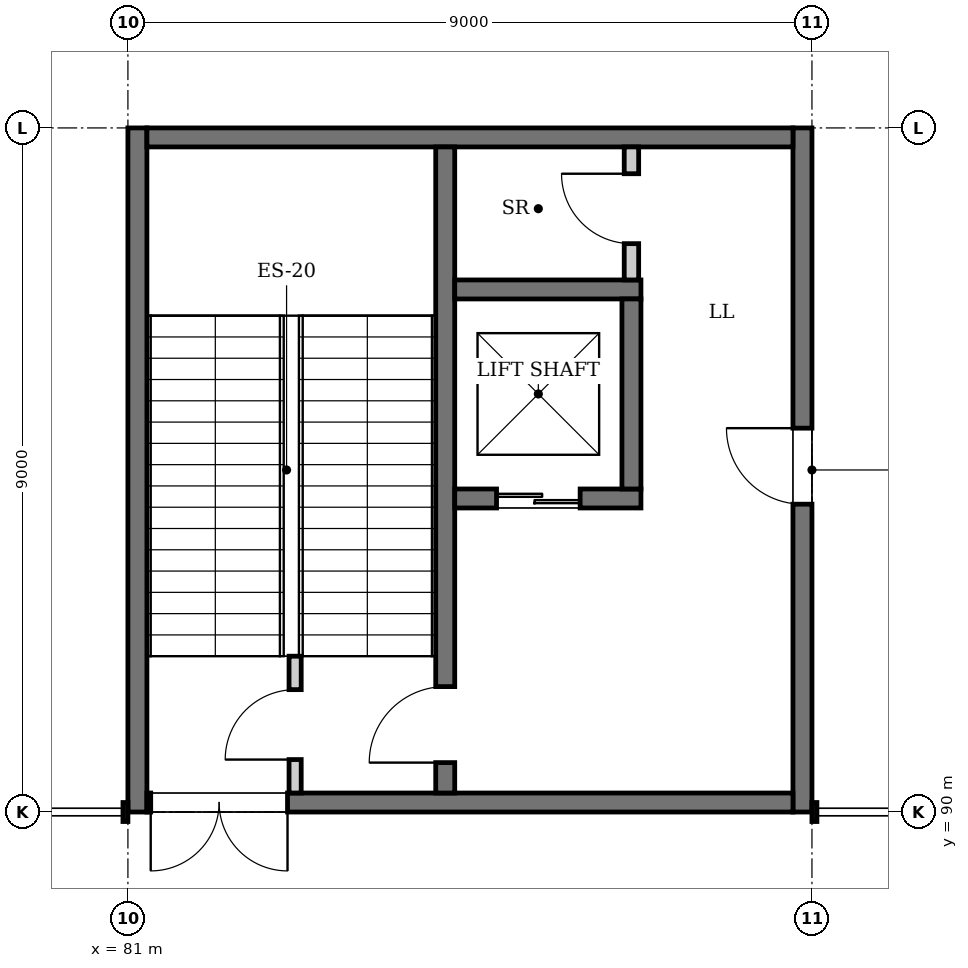
"""IFC4 building model, lengths in metres.
Left out: names, types, materials, properties, quantities, classifications, styles, units other than length and angle.
Written with IfcOpenShell. Run it as: python <this file> out.ifc"""

import sys

from ifc_helpers import new_model, si_unit, direction, frame, frame_2d, origin, place, context, subcontext, project, spatial, rectangle, extrude, element, fill, save


model = new_model("IFC4")
c1 = context("Model", 3, precision=1e-05, world=origin(), true_north=direction((0.0, 1.0)))
c2 = subcontext(c1, "Body", "Model", "MODEL_VIEW")
j1 = project(units=[si_unit("LENGTHUNIT", "METRE"), si_unit("PLANEANGLEUNIT", "RADIAN")], contexts=[c1])
p1 = place(None, origin())
s1 = spatial("IfcSite", under=j1, at=p1, CompositionType="ELEMENT")
p2 = place(p1, origin())
s2 = spatial("IfcBuilding", under=s1, at=p2, CompositionType="ELEMENT")
p3 = place(p2, origin())
s3 = spatial("IfcBuildingStorey", under=s2, at=p3, CompositionType="ELEMENT", Elevation=0.0)
p4 = place(p3, frame((81.125, 90.0, 0.0), z_axis=(0.0, 0.0, 1.0), x_axis=(0.0, 1.0, 0.0)))
e1 = element("IfcWall", 1, at=p4, inside=s3, PredefinedType="SHEAR", context=c2, shape_type="SweptSolid", body=[
    extrude(rectangle(XDim=9.0, YDim=0.25, at=frame_2d((4.5, 0.0))), origin(), (0.0, 0.0, 1.0), 6.0),
])
p5 = place(p3, frame((89.875, 90.0, 0.0), z_axis=(0.0, 0.0, 1.0), x_axis=(0.0, 1.0, 0.0)))
e2 = element("IfcWall", 2, at=p5, inside=s3, PredefinedType="SHEAR", context=c2, shape_type="SweptSolid", body=[
    extrude(rectangle(XDim=9.0, YDim=0.25, at=frame_2d((4.5, 0.0))), origin(), (0.0, 0.0, 1.0), 6.0),
])
p6 = place(p5, frame((4.05, 0.0, 0.0)))
e3 = element("IfcOpeningElement", 3, at=p6, cuts=e2, PredefinedType="OPENING", context=c2, shape_type="SweptSolid", body=[
    extrude(rectangle(XDim=1.0, YDim=2.1, at=frame_2d((0.5, 1.05))), frame((0.0, 0.135, 0.0), z_axis=(0.0, -1.0, 0.0), x_axis=(1.0, 0.0, 0.0)), (0.0, 0.0, 1.0), 0.27),
])
p7 = place(p3, frame((81.25, 90.125, 0.0), z_axis=(0.0, 0.0, 1.0), x_axis=(1.0, 0.0, 0.0)))
e4 = element("IfcWall", 4, at=p7, inside=s3, PredefinedType="SHEAR", context=c2, shape_type="SweptSolid", body=[
    extrude(rectangle(XDim=8.5, YDim=0.25, at=frame_2d((4.25, 0.0))), origin(), (0.0, 0.0, 1.0), 6.0),
])
p8 = place(p7, frame((0.05, 0.0, 0.0)))
e5 = element("IfcOpeningElement", 5, at=p8, cuts=e4, PredefinedType="OPENING", context=c2, shape_type="SweptSolid", body=[
    extrude(rectangle(XDim=1.8, YDim=2.4, at=frame_2d((0.9, 1.2))), frame((0.0, 0.135, 0.0), z_axis=(0.0, -1.0, 0.0), x_axis=(1.0, 0.0, 0.0)), (0.0, 0.0, 1.0), 0.27),
])
p9 = place(p3, frame((81.25, 98.875, 0.0), z_axis=(0.0, 0.0, 1.0), x_axis=(1.0, 0.0, 0.0)))
e6 = element("IfcWall", 6, at=p9, inside=s3, PredefinedType="SHEAR", context=c2, shape_type="SweptSolid", body=[
    extrude(rectangle(XDim=8.5, YDim=0.25, at=frame_2d((4.25, 0.0))), origin(), (0.0, 0.0, 1.0), 6.0),
])
p10 = place(p3, frame((85.175, 90.25, 0.0), z_axis=(0.0, 0.0, 1.0), x_axis=(0.0, 1.0, 0.0)))
e7 = element("IfcWall", 7, at=p10, inside=s3, PredefinedType="SOLIDWALL", context=c2, shape_type="SweptSolid", body=[
    extrude(rectangle(XDim=8.5, YDim=0.25, at=frame_2d((4.25, 0.0))), origin(), (0.0, 0.0, 1.0), 5.75),
])
p11 = place(p10, frame((0.4, 0.0, 0.0)))
e8 = element("IfcOpeningElement", 8, at=p11, cuts=e7, PredefinedType="OPENING", context=c2, shape_type="SweptSolid", body=[
    extrude(rectangle(XDim=1.0, YDim=2.1, at=frame_2d((0.5, 1.05))), frame((0.0, 0.135, 0.0), z_axis=(0.0, -1.0, 0.0), x_axis=(1.0, 0.0, 0.0)), (0.0, 0.0, 1.0), 0.27),
])
p12 = place(p3, frame((85.3, 94.125, 0.0), z_axis=(0.0, 0.0, 1.0), x_axis=(1.0, 0.0, 0.0)))
e9 = element("IfcWall", 9, at=p12, inside=s3, PredefinedType="SOLIDWALL", context=c2, shape_type="SweptSolid", body=[
    extrude(rectangle(XDim=2.45, YDim=0.25, at=frame_2d((1.225, 0.0))), origin(), (0.0, 0.0, 1.0), 6.0),
])
p13 = place(p12, frame((0.55, 0.0, 0.0)))
e10 = element("IfcOpeningElement", 10, at=p13, cuts=e9, PredefinedType="OPENING", context=c2, shape_type="SweptSolid", body=[
    extrude(rectangle(XDim=1.1, YDim=2.1, at=frame_2d((0.55, 1.05))), frame((0.0, 0.135, 0.0), z_axis=(0.0, -1.0, 0.0), x_axis=(1.0, 0.0, 0.0)), (0.0, 0.0, 1.0), 0.27),
])
p14 = place(p3, frame((85.3, 96.875, 0.0), z_axis=(0.0, 0.0, 1.0), x_axis=(1.0, 0.0, 0.0)))
e11 = element("IfcWall", 11, at=p14, inside=s3, PredefinedType="SOLIDWALL", context=c2, shape_type="SweptSolid", body=[
    extrude(rectangle(XDim=2.45, YDim=0.25, at=frame_2d((1.225, 0.0))), origin(), (0.0, 0.0, 1.0), 6.0),
])
p15 = place(p3, frame((87.625, 94.25, 0.0), z_axis=(0.0, 0.0, 1.0), x_axis=(0.0, 1.0, 0.0)))
e12 = element("IfcWall", 12, at=p15, inside=s3, PredefinedType="SOLIDWALL", context=c2, shape_type="SweptSolid", body=[
    extrude(rectangle(XDim=2.5, YDim=0.25, at=frame_2d((1.25, 0.0))), origin(), (0.0, 0.0, 1.0), 6.0),
])
p16 = place(p3, frame((83.2, 90.25, 0.0), z_axis=(0.0, 0.0, 1.0), x_axis=(0.0, 1.0, 0.0)))
e13 = element("IfcWall", 13, at=p16, inside=s3, PredefinedType="PARTITIONING", context=c2, shape_type="SweptSolid", body=[
    extrude(rectangle(XDim=1.8, YDim=0.16, at=frame_2d((0.9, 0.0))), origin(), (0.0, 0.0, 1.0), 5.75),
])
p17 = place(p16, frame((0.44, 0.0, 0.0)))
e14 = element("IfcOpeningElement", 14, at=p17, cuts=e13, PredefinedType="OPENING", context=c2, shape_type="SweptSolid", body=[
    extrude(rectangle(XDim=0.92, YDim=2.1, at=frame_2d((0.46, 1.05))), frame((0.0, 0.09, 0.0), z_axis=(0.0, -1.0, 0.0), x_axis=(1.0, 0.0, 0.0)), (0.0, 0.0, 1.0), 0.18),
])
p18 = place(p3, frame((87.625, 97.0, 0.0), z_axis=(0.0, 0.0, 1.0), x_axis=(0.0, 1.0, 0.0)))
e15 = element("IfcWall", 15, at=p18, inside=s3, PredefinedType="PARTITIONING", context=c2, shape_type="SweptSolid", body=[
    extrude(rectangle(XDim=1.75, YDim=0.19, at=frame_2d((0.875, 0.0))), origin(), (0.0, 0.0, 1.0), 5.75),
])
p19 = place(p18, frame((0.478, 0.0, 0.0)))
e16 = element("IfcOpeningElement", 16, at=p19, cuts=e15, PredefinedType="OPENING", context=c2, shape_type="SweptSolid", body=[
    extrude(rectangle(XDim=0.92, YDim=2.1, at=frame_2d((0.46, 1.05))), frame((0.0, 0.105, 0.0), z_axis=(0.0, -1.0, 0.0), x_axis=(1.0, 0.0, 0.0)), (0.0, 0.0, 1.0), 0.21),
])
p20 = place(p8, frame((1.8, 0.0, 0.0), z_axis=(0.0, 0.0, 1.0), x_axis=(-1.0, 0.0, 0.0)))
e17 = element("IfcDoor", 17, at=p20, inside=s3, OperationType="DOUBLE_DOOR_SINGLE_SWING", PredefinedType="DOOR", context=c2, shape_type="SweptSolid", body=[
    extrude(rectangle(XDim=1.8, YDim=2.4, at=frame_2d((0.9, 1.2))), frame((0.0, 0.025, 0.0), z_axis=(0.0, -1.0, 0.0), x_axis=(1.0, 0.0, 0.0)), (0.0, 0.0, 1.0), 0.05),
])
fill(e5, e17)
p21 = place(p13, origin())
e18 = element("IfcDoor", 18, at=p21, inside=s3, OperationType="DOUBLE_DOOR_SLIDING", PredefinedType="DOOR", context=c2, shape_type="SweptSolid", body=[
    extrude(rectangle(XDim=1.1, YDim=2.1, at=frame_2d((0.55, 1.05))), frame((0.0, 0.025, 0.0), z_axis=(0.0, -1.0, 0.0), x_axis=(1.0, 0.0, 0.0)), (0.0, 0.0, 1.0), 0.05),
])
fill(e10, e18)
p22 = place(p11, origin())
e19 = element("IfcDoor", 19, at=p22, inside=s3, OperationType="SINGLE_SWING_LEFT", PredefinedType="DOOR", context=c2, shape_type="SweptSolid", body=[
    extrude(rectangle(XDim=1.0, YDim=2.1, at=frame_2d((0.5, 1.05))), frame((0.0, 0.025, 0.0), z_axis=(0.0, -1.0, 0.0), x_axis=(1.0, 0.0, 0.0)), (0.0, 0.0, 1.0), 0.05),
])
fill(e8, e19)
p23 = place(p19, origin())
e20 = element("IfcDoor", 20, at=p23, inside=s3, OperationType="SINGLE_SWING_RIGHT", PredefinedType="DOOR", context=c2, shape_type="SweptSolid", body=[
    extrude(rectangle(XDim=0.92, YDim=2.1, at=frame_2d((0.46, 1.05))), frame((0.0, 0.025, 0.0), z_axis=(0.0, -1.0, 0.0), x_axis=(1.0, 0.0, 0.0)), (0.0, 0.0, 1.0), 0.05),
])
fill(e16, e20)
p24 = place(p17, origin())
e21 = element("IfcDoor", 21, at=p24, inside=s3, OperationType="SINGLE_SWING_LEFT", PredefinedType="DOOR", context=c2, shape_type="SweptSolid", body=[
    extrude(rectangle(XDim=0.92, YDim=2.1, at=frame_2d((0.46, 1.05))), frame((0.0, 0.025, 0.0), z_axis=(0.0, -1.0, 0.0), x_axis=(1.0, 0.0, 0.0)), (0.0, 0.0, 1.0), 0.05),
])
fill(e14, e21)
p25 = place(p6, origin())
e22 = element("IfcDoor", 22, at=p25, inside=s3, OperationType="SINGLE_SWING_RIGHT", PredefinedType="DOOR", context=c2, shape_type="SweptSolid", body=[
    extrude(rectangle(XDim=1.0, YDim=2.1, at=frame_2d((0.5, 1.05))), frame((0.0, 0.025, 0.0), z_axis=(0.0, -1.0, 0.0), x_axis=(1.0, 0.0, 0.0)), (0.0, 0.0, 1.0), 0.05),
])
fill(e3, e22)
save(model, sys.argv[1])
